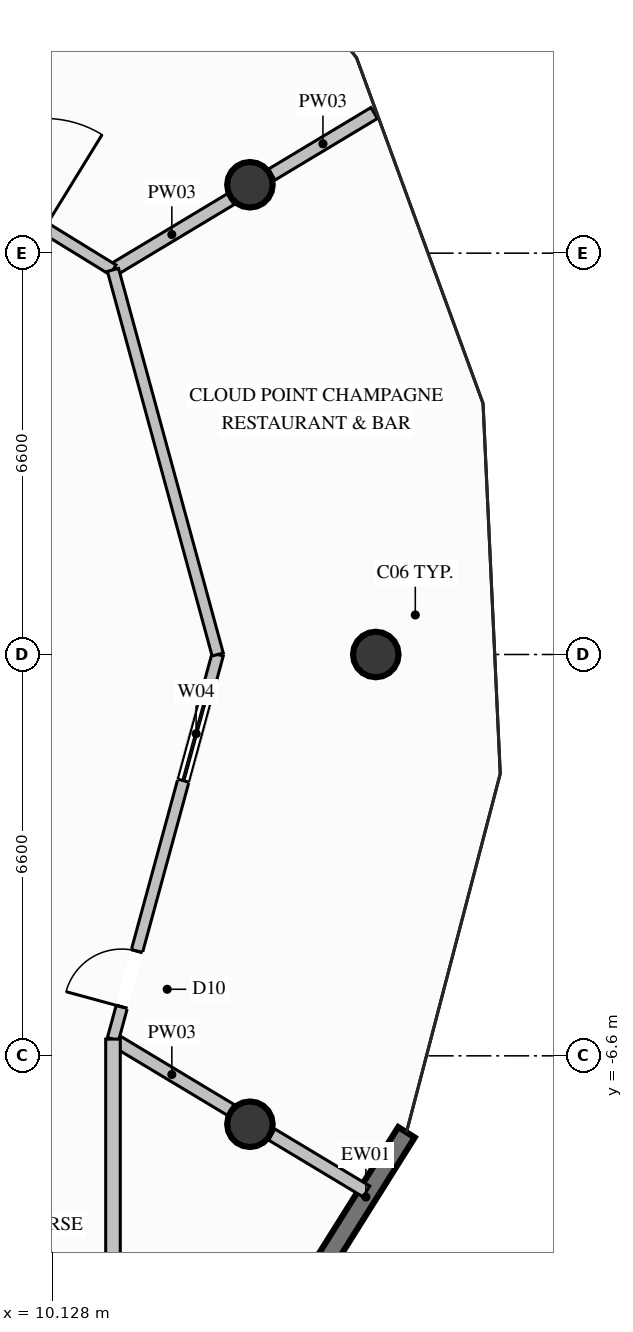
"""IFC4 building model, lengths in metres.
Left out: names, types, materials, properties, quantities, classifications, styles, units other than length and angle.
Written with IfcOpenShell. Run it as: python <this file> out.ifc"""

import sys

from ifc_helpers import new_model, si_unit, direction, frame, frame_2d, origin, origin_2d, place, context, subcontext, project, spatial, rectangle, circle, extrude, element, fill, save


model = new_model("IFC4")
c1 = context("Model", 3, precision=1e-05, world=origin(), true_north=direction((0.0, 1.0)))
c2 = subcontext(c1, "Body", "Model", "MODEL_VIEW")
j1 = project(units=[si_unit("LENGTHUNIT", "METRE"), si_unit("PLANEANGLEUNIT", "RADIAN")], contexts=[c1])
p1 = place(None, origin())
s1 = spatial("IfcSite", under=j1, at=p1, CompositionType="ELEMENT")
p2 = place(p1, origin())
s2 = spatial("IfcBuilding", under=s1, at=p2, CompositionType="ELEMENT")
p3 = place(p2, frame((0.0, 0.0, 297.2)))
s3 = spatial("IfcBuildingStorey", under=s2, at=p3, CompositionType="ELEMENT", Elevation=297.2)
for number, where, z_axis, x_axis in (
    (1, (15.45, 0.0, 0.0), (0.0, 0.0, 1.0), (1.0, 0.0, 0.0)),
    (2, (13.38, 7.725, 0.0), (0.0, 0.0, 1.0), (1.0, 0.0, 0.0)),
    (3, (13.38, -7.725, 0.0), (0.0, 0.0, 1.0), (1.0, 0.0, 0.0)),
):
    element("IfcColumn", number, at=place(p3, frame(where, z_axis=z_axis, x_axis=x_axis)), inside=s3, PredefinedType="COLUMN", context=c2, shape_type="SweptSolid", body=[
        extrude(circle(Radius=0.375, at=origin_2d()), origin(), (0.0, 0.0, 1.0), 5.0),
    ])
p4 = place(p3, frame((15.955, -7.857, 0.0), z_axis=(0.0, 0.0, 1.0), x_axis=(-0.53141560639, -0.847111240207, 0.0)))
e4 = element("IfcWall", 4, at=p4, inside=s3, PredefinedType="SOLIDWALL", context=c2, shape_type="SweptSolid", body=[
    extrude(rectangle(XDim=6.054, YDim=0.32, at=frame_2d((3.027, 0.0))), origin(), (0.0, 0.0, 1.0), 4.72),
])
p5 = place(p4, frame((2.764, 0.0, 0.6)))
e5 = element("IfcOpeningElement", 5, at=p5, cuts=e4, PredefinedType="OPENING", context=c2, shape_type="SweptSolid", body=[
    extrude(rectangle(XDim=1.8, YDim=2.2, at=frame_2d((0.9, 1.1))), frame((0.0, 0.17, 0.0), z_axis=(0.0, -1.0, 0.0), x_axis=(1.0, 0.0, 0.0)), (0.0, 0.0, 1.0), 0.34),
])
p6 = place(p3, frame((11.128, 6.325, 0.0), z_axis=(0.0, 0.0, 1.0), x_axis=(0.857206654834, 0.514972572967, 0.0)))
e6 = element("IfcWall", 6, at=p6, inside=s3, PredefinedType="PARTITIONING", context=c2, shape_type="SweptSolid", body=[
    extrude(rectangle(XDim=2.259, YDim=0.21, at=frame_2d((1.129, 0.0))), origin(), (0.0, 0.0, 1.0), 2.905),
])
p7 = place(p3, frame((13.738, 7.892, 0.0), z_axis=(0.0, 0.0, 1.0), x_axis=(0.857197078032, 0.514988513865, 0.0)))
e7 = element("IfcWall", 7, at=p7, inside=s3, PredefinedType="PARTITIONING", context=c2, shape_type="SweptSolid", body=[
    extrude(rectangle(XDim=1.967, YDim=0.21, at=frame_2d((0.983, 0.0))), origin(), (0.0, 0.0, 1.0), 4.72),
])
p8 = place(p3, frame((11.128, -6.325, 0.0), z_axis=(0.0, 0.0, 1.0), x_axis=(0.857015766595, -0.515290186018, 0.0)))
e8 = element("IfcWall", 8, at=p8, inside=s3, PredefinedType="PARTITIONING", context=c2, shape_type="SweptSolid", body=[
    extrude(rectangle(XDim=2.259, YDim=0.21, at=frame_2d((1.129, 0.0))), origin(), (0.0, 0.0, 1.0), 2.905),
])
p9 = place(p3, frame((13.737, -7.893, 0.0), z_axis=(0.0, 0.0, 1.0), x_axis=(0.857019202275, -0.515284471853, 0.0)))
e9 = element("IfcWall", 9, at=p9, inside=s3, PredefinedType="PARTITIONING", context=c2, shape_type="SweptSolid", body=[
    extrude(rectangle(XDim=1.82, YDim=0.21, at=frame_2d((0.91, 0.0))), origin(), (0.0, 0.0, 1.0), 4.72),
])
p10 = place(p3, frame((7.35, 8.65, 0.0), z_axis=(0.0, 0.0, 1.0), x_axis=(0.851645088617, -0.524118920699, 0.0)))
e10 = element("IfcWall", 10, at=p10, inside=s3, PredefinedType="PARTITIONING", context=c2, shape_type="SweptSolid", body=[
    extrude(rectangle(XDim=4.436, YDim=0.19, at=frame_2d((2.218, 0.0))), origin(), (0.0, 0.0, 1.0), 4.72),
])
p11 = place(p10, frame((1.318, 0.0, 0.0)))
e11 = element("IfcOpeningElement", 11, at=p11, cuts=e10, PredefinedType="OPENING", context=c2, shape_type="SweptSolid", body=[
    extrude(rectangle(XDim=1.8, YDim=2.4, at=frame_2d((0.9, 1.2))), frame((0.0, 0.105, 0.0), z_axis=(0.0, -1.0, 0.0), x_axis=(1.0, 0.0, 0.0)), (0.0, 0.0, 1.0), 0.21),
])
p12 = place(p3, frame((11.128, -6.325, 0.0), z_axis=(0.0, 0.0, 1.0), x_axis=(0.262717156474, 0.964872890952, 0.0)))
e12 = element("IfcWall", 12, at=p12, inside=s3, PredefinedType="PARTITIONING", context=c2, shape_type="SweptSolid", body=[
    extrude(rectangle(XDim=6.555, YDim=0.19, at=frame_2d((3.278, 0.0))), origin(), (0.0, 0.0, 1.0), 4.72),
])
p13 = place(p12, frame((0.55, 0.0, 0.0)))
e13 = element("IfcOpeningElement", 13, at=p13, cuts=e12, PredefinedType="OPENING", context=c2, shape_type="SweptSolid", body=[
    extrude(rectangle(XDim=0.95, YDim=2.1, at=frame_2d((0.475, 1.05))), frame((0.0, 0.105, 0.0), z_axis=(0.0, -1.0, 0.0), x_axis=(1.0, 0.0, 0.0)), (0.0, 0.0, 1.0), 0.21),
])
p14 = place(p12, frame((4.405, 0.0, 0.9)))
e14 = element("IfcOpeningElement", 14, at=p14, cuts=e12, PredefinedType="OPENING", context=c2, shape_type="SweptSolid", body=[
    extrude(rectangle(XDim=1.6, YDim=1.4, at=frame_2d((0.8, 0.7))), frame((0.0, 0.105, 0.0), z_axis=(0.0, -1.0, 0.0), x_axis=(1.0, 0.0, 0.0)), (0.0, 0.0, 1.0), 0.21),
])
p15 = place(p3, frame((12.85, 0.0, 0.0), z_axis=(0.0, 0.0, 1.0), x_axis=(-0.262717156474, 0.964872890952, 0.0)))
e15 = element("IfcWall", 15, at=p15, inside=s3, PredefinedType="PARTITIONING", context=c2, shape_type="SweptSolid", body=[
    extrude(rectangle(XDim=6.555, YDim=0.19, at=frame_2d((3.278, 0.0))), origin(), (0.0, 0.0, 1.0), 4.72),
])
p16 = place(p3, frame((11.128, -11.8, 0.0), z_axis=(0.0, 0.0, 1.0), x_axis=(0.0, 1.0, 0.0)))
e16 = element("IfcWall", 16, at=p16, inside=s3, PredefinedType="PARTITIONING", context=c2, shape_type="SweptSolid", body=[
    extrude(rectangle(XDim=5.475, YDim=0.24, at=frame_2d((2.738, 0.0))), origin(), (0.0, 0.0, 1.0), 4.72),
])
p17 = place(p13, origin())
e17 = element("IfcDoor", 17, at=p17, inside=s3, OperationType="SINGLE_SWING_LEFT", PredefinedType="DOOR", context=c2, shape_type="SweptSolid", body=[
    extrude(rectangle(XDim=0.95, YDim=2.1, at=frame_2d((0.475, 1.05))), frame((0.0, 0.025, 0.0), z_axis=(0.0, -1.0, 0.0), x_axis=(1.0, 0.0, 0.0)), (0.0, 0.0, 1.0), 0.05),
])
fill(e13, e17)
p18 = place(p14, origin())
e18 = element("IfcWindow", 18, at=p18, inside=s3, PartitioningType="SINGLE_PANEL", PredefinedType="WINDOW", context=c2, shape_type="SweptSolid", body=[
    extrude(rectangle(XDim=1.6, YDim=1.4, at=frame_2d((0.8, 0.7))), frame((0.0, 0.03, 0.0), z_axis=(0.0, -1.0, 0.0), x_axis=(1.0, 0.0, 0.0)), (0.0, 0.0, 1.0), 0.06),
])
fill(e14, e18)
save(model, sys.argv[1])
